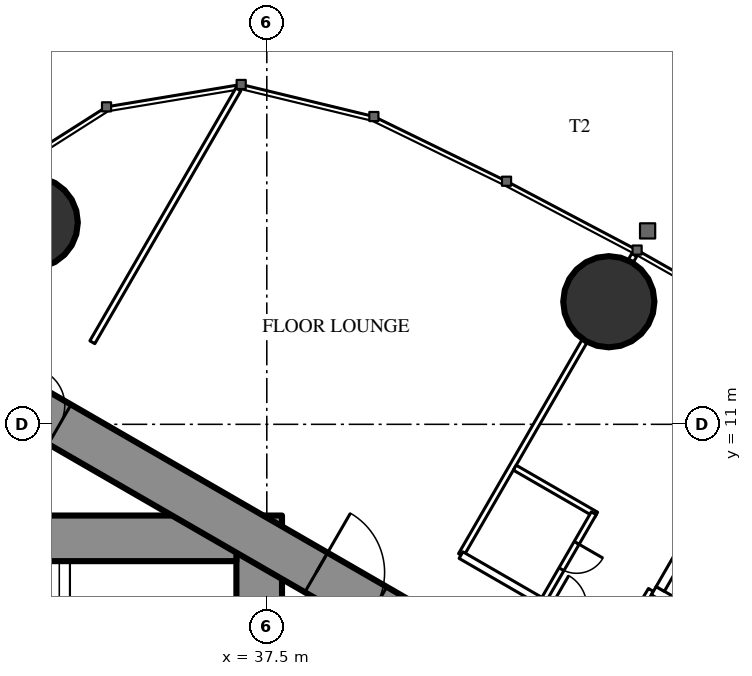
"""IFC4 building model, lengths in metres.
Left out: names, types, materials, properties, quantities, classifications, styles, units other than length and angle.
Written with IfcOpenShell. Run it as: python <this file> out.ifc"""

import sys

from ifc_helpers import new_model, si_unit, direction, frame, frame_2d, origin, origin_2d, place, context, subcontext, project, spatial, rectangle, circle, extrude, element, fill, save


model = new_model("IFC4")
c1 = context("Model", 3, precision=1e-05, world=origin(), true_north=direction((0.0, 1.0)))
c2 = subcontext(c1, "Body", "Model", "MODEL_VIEW")
j1 = project(units=[si_unit("LENGTHUNIT", "METRE"), si_unit("PLANEANGLEUNIT", "RADIAN")], contexts=[c1])
p1 = place(None, origin())
s1 = spatial("IfcSite", under=j1, at=p1, CompositionType="ELEMENT")
p2 = place(p1, origin())
s2 = spatial("IfcBuilding", under=s1, at=p2, CompositionType="ELEMENT")
p3 = place(p2, frame((0.0, 0.0, 236.9)))
s3 = spatial("IfcBuildingStorey", under=s2, at=p3, CompositionType="ELEMENT", Elevation=236.9)
for number, where, z_axis, x_axis in (
    (1, (31.328, 16.311, 0.0), (0.0, 0.0, 1.0), (1.0, 0.0, 0.0)),
    (2, (46.499, 14.226, 0.0), (0.0, 0.0, 1.0), (1.0, 0.0, 0.0)),
):
    element("IfcColumn", number, at=place(p3, frame(where, z_axis=z_axis, x_axis=x_axis)), inside=s3, PredefinedType="COLUMN", context=c2, shape_type="SweptSolid", body=[
        extrude(circle(Radius=1.2, at=origin_2d()), origin(), (0.0, 0.0, 1.0), 3.6),
    ])
p4 = place(p3, frame((37.3, -8.6, 0.0), z_axis=(0.0, 0.0, 1.0), x_axis=(0.0, 1.0, 0.0)))
e3 = element("IfcWall", 3, at=p4, inside=s3, PredefinedType="SHEAR", context=c2, shape_type="SweptSolid", body=[
    extrude(rectangle(XDim=17.2, YDim=1.2, at=frame_2d((8.6, 0.0))), origin(), (0.0, 0.0, 1.0), 3.6),
])
p5 = place(p4, frame((7.7, 0.0, 0.0)))
e4 = element("IfcOpeningElement", 4, at=p5, cuts=e3, PredefinedType="OPENING", context=c2, shape_type="SweptSolid", body=[
    extrude(rectangle(XDim=1.8, YDim=2.2, at=frame_2d((0.9, 1.1))), frame((0.0, 0.61, 0.0), z_axis=(0.0, -1.0, 0.0), x_axis=(1.0, 0.0, 0.0)), (0.0, 0.0, 1.0), 1.22),
])
p6 = place(p3, frame((28.3, 8.0, 0.0), z_axis=(0.0, 0.0, 1.0), x_axis=(1.0, 0.0, 0.0)))
e5 = element("IfcWall", 5, at=p6, inside=s3, PredefinedType="SHEAR", context=c2, shape_type="SweptSolid", body=[
    extrude(rectangle(XDim=8.4, YDim=1.2, at=frame_2d((4.2, 0.0))), origin(), (0.0, 0.0, 1.0), 3.6),
])
p7 = place(p6, frame((0.25, 0.0, 0.0)))
e6 = element("IfcOpeningElement", 6, at=p7, cuts=e5, PredefinedType="OPENING", context=c2, shape_type="SweptSolid", body=[
    extrude(rectangle(XDim=1.0, YDim=2.2, at=frame_2d((0.5, 1.1))), frame((0.0, 0.61, 0.0), z_axis=(0.0, -1.0, 0.0), x_axis=(1.0, 0.0, 0.0)), (0.0, 0.0, 1.0), 1.22),
])
p8 = place(p3, frame((27.2, 13.8, 0.0), z_axis=(0.0, 0.0, 1.0), x_axis=(0.866024515034, -0.500001539357, 0.0)))
e7 = element("IfcWall", 7, at=p8, inside=s3, PredefinedType="SHEAR", context=c2, shape_type="SweptSolid", body=[
    extrude(rectangle(XDim=26.907, YDim=1.2, at=frame_2d((13.454, 0.0))), origin(), (0.0, 0.0, 1.0), 3.6),
])
p9 = place(p8, frame((4.6, 0.0, 0.0)))
e8 = element("IfcOpeningElement", 8, at=p9, cuts=e7, PredefinedType="OPENING", context=c2, shape_type="SweptSolid", body=[
    extrude(rectangle(XDim=1.0, YDim=2.2, at=frame_2d((0.5, 1.1))), frame((0.0, 0.61, 0.0), z_axis=(0.0, -1.0, 0.0), x_axis=(1.0, 0.0, 0.0)), (0.0, 0.0, 1.0), 1.22),
])
p10 = place(p8, frame((13.395, 0.0, 0.0)))
e9 = element("IfcOpeningElement", 9, at=p10, cuts=e7, PredefinedType="OPENING", context=c2, shape_type="SweptSolid", body=[
    extrude(rectangle(XDim=1.8, YDim=2.2, at=frame_2d((0.9, 1.1))), frame((0.0, 0.61, 0.0), z_axis=(0.0, -1.0, 0.0), x_axis=(1.0, 0.0, 0.0)), (0.0, 0.0, 1.0), 1.22),
])
p11 = place(p3, frame((32.91, 13.159, 0.0), z_axis=(0.0, 0.0, 1.0), x_axis=(0.500014963534, 0.866016764412, 0.0)))
e10 = element("IfcWall", 10, at=p11, inside=s3, PredefinedType="PARTITIONING", context=c2, shape_type="SweptSolid", body=[
    extrude(rectangle(XDim=7.682, YDim=0.15, at=frame_2d((3.841, 0.0))), origin(), (0.0, 0.0, 1.0), 3.35),
])
p12 = place(p3, frame((42.61, 7.559, 0.0), z_axis=(0.0, 0.0, 1.0), x_axis=(0.500014058812, 0.866017286774, 0.0)))
e11 = element("IfcWall", 11, at=p12, inside=s3, PredefinedType="PARTITIONING", context=c2, shape_type="SweptSolid", body=[
    extrude(rectangle(XDim=6.498, YDim=0.15, at=frame_2d((3.249, 0.0))), origin(), (0.0, 0.0, 1.0), 2.45),
])
p13 = place(p3, frame((47.079, 15.3, 0.0), z_axis=(0.0, 0.0, 1.0), x_axis=(0.499212083968, 0.866479829667, 0.0)))
e12 = element("IfcWall", 12, at=p13, inside=s3, PredefinedType="PARTITIONING", context=c2, shape_type="SweptSolid", body=[
    extrude(rectangle(XDim=0.179, YDim=0.15, at=frame_2d((0.09, 0.0))), origin(), (0.0, 0.0, 1.0), 2.45),
])
p14 = place(p3, frame((47.606, 6.642, 0.0), z_axis=(0.0, 0.0, 1.0), x_axis=(-0.51353662755, -0.858067673418, 0.0)))
e13 = element("IfcWall", 13, at=p14, inside=s3, PredefinedType="PARTITIONING", context=c2, shape_type="SweptSolid", body=[
    extrude(rectangle(XDim=1.91, YDim=0.15, at=frame_2d((0.955, 0.0))), origin(), (0.0, 0.0, 1.0), 3.35),
])
p15 = place(p3, frame((44.025, 9.86, 0.0), z_axis=(0.0, 0.0, 1.0), x_axis=(0.866006523861, -0.500032699561, 0.0)))
e14 = element("IfcWall", 14, at=p15, inside=s3, PredefinedType="PARTITIONING", context=c2, shape_type="SweptSolid", body=[
    extrude(rectangle(XDim=2.475, YDim=0.15, at=frame_2d((1.237, 0.0))), origin(), (0.0, 0.0, 1.0), 3.35),
])
p16 = place(p3, frame((44.803, 6.408, 0.0), z_axis=(0.0, 0.0, 1.0), x_axis=(0.500047596559, 0.865997922154, 0.0)))
e15 = element("IfcWall", 15, at=p16, inside=s3, PredefinedType="PARTITIONING", context=c2, shape_type="SweptSolid", body=[
    extrude(rectangle(XDim=2.6, YDim=0.15, at=frame_2d((1.3, 0.0))), origin(), (0.0, 0.0, 1.0), 3.35),
])
p17 = place(p16, frame((0.9, 0.0, 0.0)))
e16 = element("IfcOpeningElement", 16, at=p17, cuts=e15, PredefinedType="OPENING", context=c2, shape_type="SweptSolid", body=[
    extrude(rectangle(XDim=0.8, YDim=2.2, at=frame_2d((0.4, 1.1))), frame((0.0, 0.085, 0.0), z_axis=(0.0, -1.0, 0.0), x_axis=(1.0, 0.0, 0.0)), (0.0, 0.0, 1.0), 0.17),
])
p18 = place(p3, frame((42.61, 7.559, 0.0), z_axis=(0.0, 0.0, 1.0), x_axis=(0.866032081755, -0.499988433238, 0.0)))
e17 = element("IfcWall", 17, at=p18, inside=s3, PredefinedType="PARTITIONING", context=c2, shape_type="SweptSolid", body=[
    extrude(rectangle(XDim=4.741, YDim=0.2, at=frame_2d((2.37, 0.0))), origin(), (0.0, 0.0, 1.0), 3.35),
])
p19 = place(p18, frame((2.725, 0.0, 0.0)))
e18 = element("IfcOpeningElement", 18, at=p19, cuts=e17, PredefinedType="OPENING", context=c2, shape_type="SweptSolid", body=[
    extrude(rectangle(XDim=0.95, YDim=2.2, at=frame_2d((0.475, 1.1))), frame((0.0, 0.11, 0.0), z_axis=(0.0, -1.0, 0.0), x_axis=(1.0, 0.0, 0.0)), (0.0, 0.0, 1.0), 0.22),
])
p20 = place(p3, frame((47.681, 6.622, 0.0), z_axis=(0.0, 0.0, 1.0), x_axis=(0.86603344179, -0.499986077507, 0.0)))
e19 = element("IfcWall", 19, at=p20, inside=s3, PredefinedType="PARTITIONING", context=c2, shape_type="SweptSolid", body=[
    extrude(rectangle(XDim=6.6, YDim=0.25, at=frame_2d((3.3, 0.0))), origin(), (0.0, 0.0, 1.0), 3.35),
])
p21 = place(p20, frame((0.75, 0.0, 0.0)))
e20 = element("IfcOpeningElement", 20, at=p21, cuts=e19, PredefinedType="OPENING", context=c2, shape_type="SweptSolid", body=[
    extrude(rectangle(XDim=1.1, YDim=2.2, at=frame_2d((0.55, 1.1))), frame((0.0, 0.135, 0.0), z_axis=(0.0, -1.0, 0.0), x_axis=(1.0, 0.0, 0.0)), (0.0, 0.0, 1.0), 0.27),
])
p22 = place(p20, frame((2.75, 0.0, 0.0)))
e21 = element("IfcOpeningElement", 21, at=p22, cuts=e19, PredefinedType="OPENING", context=c2, shape_type="SweptSolid", body=[
    extrude(rectangle(XDim=1.1, YDim=2.2, at=frame_2d((0.55, 1.1))), frame((0.0, 0.135, 0.0), z_axis=(0.0, -1.0, 0.0), x_axis=(1.0, 0.0, 0.0)), (0.0, 0.0, 1.0), 0.27),
])
p23 = place(p20, frame((4.75, 0.0, 0.0)))
e22 = element("IfcOpeningElement", 22, at=p23, cuts=e19, PredefinedType="OPENING", context=c2, shape_type="SweptSolid", body=[
    extrude(rectangle(XDim=1.1, YDim=2.2, at=frame_2d((0.55, 1.1))), frame((0.0, 0.135, 0.0), z_axis=(0.0, -1.0, 0.0), x_axis=(1.0, 0.0, 0.0)), (0.0, 0.0, 1.0), 0.27),
])
p24 = place(p3, frame((47.852, 6.668, 0.0), z_axis=(0.0, 0.0, 1.0), x_axis=(0.499929347863, 0.866066190972, 0.0)))
e23 = element("IfcWall", 23, at=p24, inside=s3, PredefinedType="PARTITIONING", context=c2, shape_type="SweptSolid", body=[
    extrude(rectangle(XDim=3.201, YDim=0.25, at=frame_2d((1.6, 0.0))), origin(), (0.0, 0.0, 1.0), 3.35),
])
p25 = place(p17, origin())
e24 = element("IfcDoor", 24, at=p25, inside=s3, OperationType="SINGLE_SWING_RIGHT", PredefinedType="DOOR", context=c2, shape_type="SweptSolid", body=[
    extrude(rectangle(XDim=0.8, YDim=2.2, at=frame_2d((0.4, 1.1))), frame((0.0, 0.025, 0.0), z_axis=(0.0, -1.0, 0.0), x_axis=(1.0, 0.0, 0.0)), (0.0, 0.0, 1.0), 0.05),
])
fill(e16, e24)
p26 = place(p9, origin())
e25 = element("IfcDoor", 25, at=p26, inside=s3, OperationType="SINGLE_SWING_LEFT", PredefinedType="DOOR", context=c2, shape_type="SweptSolid", body=[
    extrude(rectangle(XDim=1.0, YDim=2.2, at=frame_2d((0.5, 1.1))), frame((0.0, 0.025, 0.0), z_axis=(0.0, -1.0, 0.0), x_axis=(1.0, 0.0, 0.0)), (0.0, 0.0, 1.0), 0.05),
])
fill(e8, e25)
p27 = place(p10, origin())
e26 = element("IfcDoor", 26, at=p27, inside=s3, OperationType="DOUBLE_DOOR_SINGLE_SWING", PredefinedType="DOOR", context=c2, shape_type="SweptSolid", body=[
    extrude(rectangle(XDim=1.8, YDim=2.2, at=frame_2d((0.9, 1.1))), frame((0.0, 0.025, 0.0), z_axis=(0.0, -1.0, 0.0), x_axis=(1.0, 0.0, 0.0)), (0.0, 0.0, 1.0), 0.05),
])
fill(e9, e26)
save(model, sys.argv[1])
